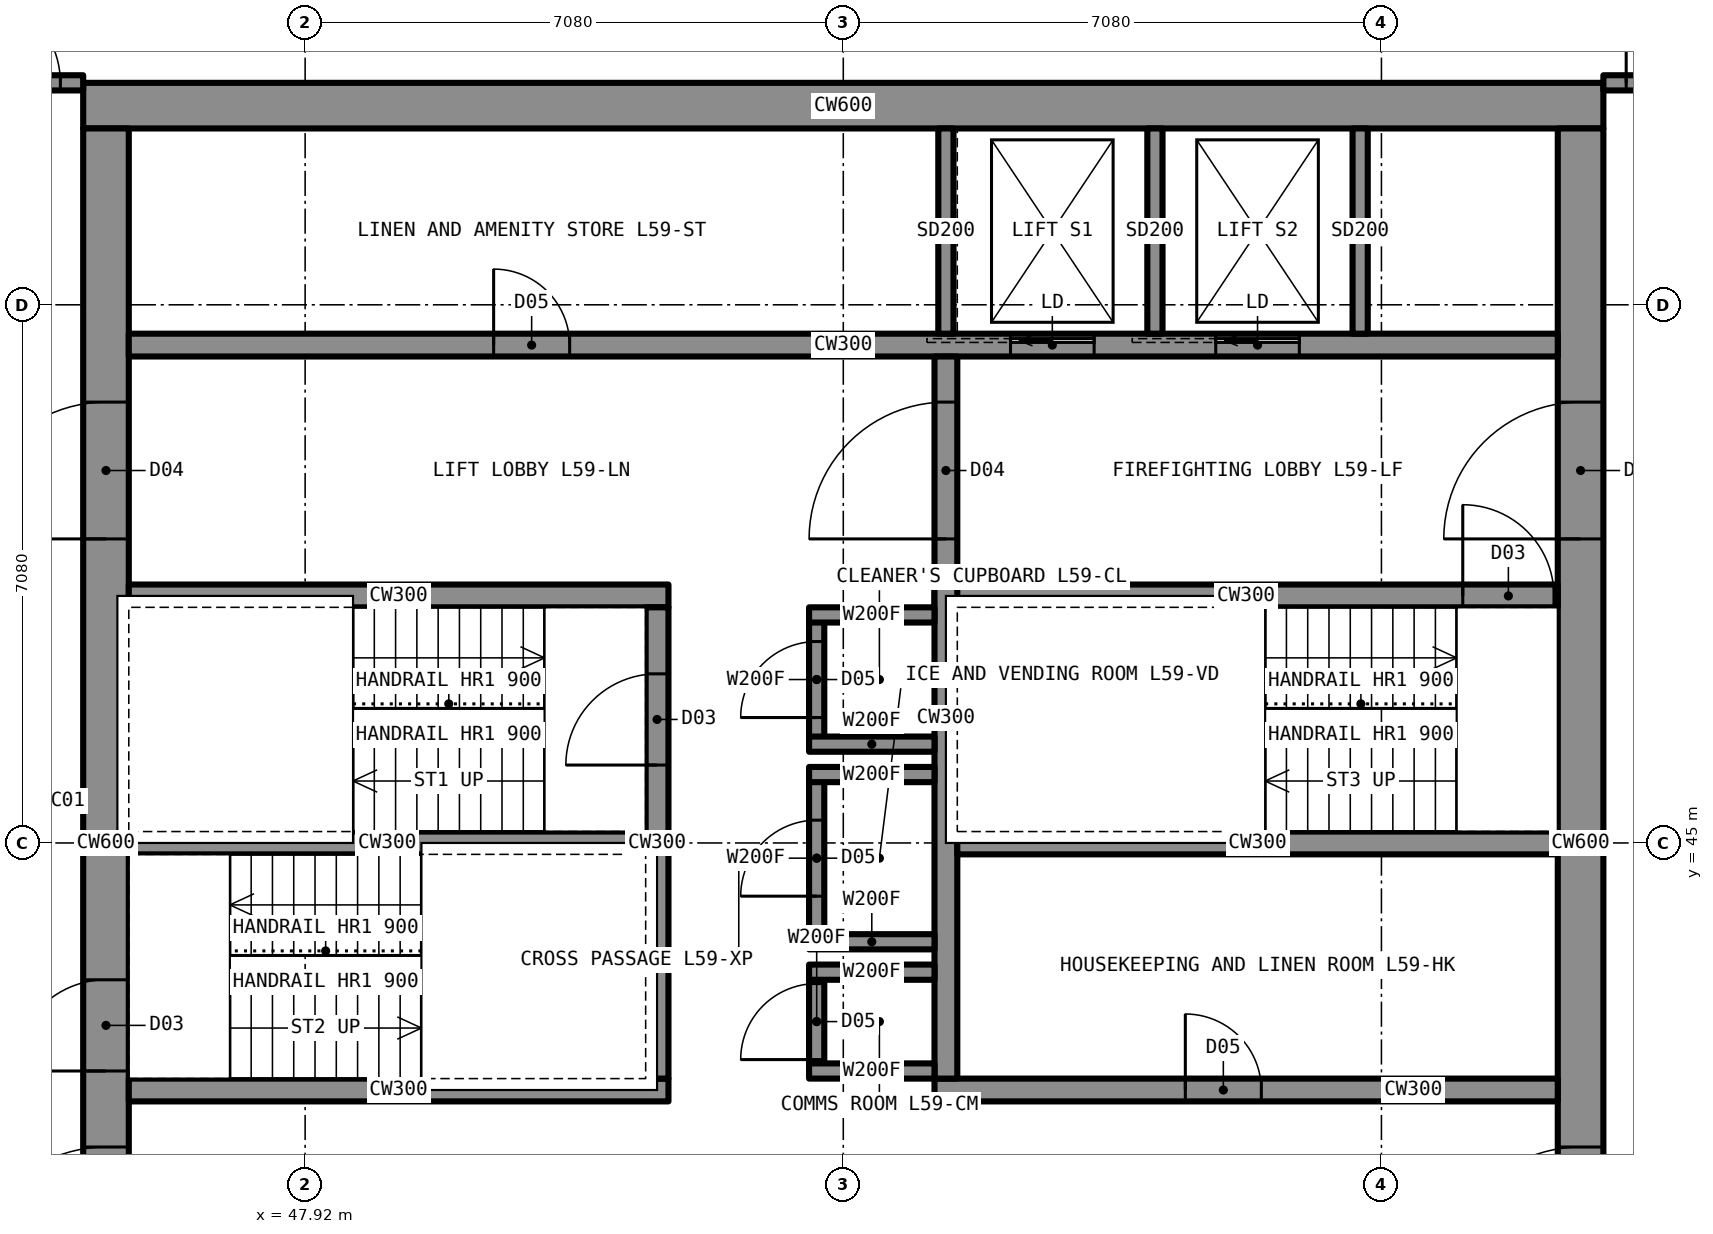
"""IFC4 building model, lengths in metres.
Left out: names, types, materials, properties, quantities, classifications, styles, units other than length and angle.
Written with IfcOpenShell. Run it as: python <this file> out.ifc"""

import sys

from ifc_helpers import new_model, si_unit, direction, frame, frame_2d, origin, place, context, subcontext, project, spatial, rectangle, extrude, element, fill, save


model = new_model("IFC4")
c1 = context("Model", 3, precision=1e-05, world=origin(), true_north=direction((0.0, 1.0)))
c2 = subcontext(c1, "Body", "Model", "MODEL_VIEW")
j1 = project(units=[si_unit("LENGTHUNIT", "METRE"), si_unit("PLANEANGLEUNIT", "RADIAN")], contexts=[c1])
p1 = place(None, origin())
s1 = spatial("IfcSite", under=j1, at=p1, CompositionType="ELEMENT")
p2 = place(p1, origin())
s2 = spatial("IfcBuilding", under=s1, at=p2, CompositionType="ELEMENT")
p3 = place(p2, frame((0.0, 0.0, 214.3)))
s3 = spatial("IfcBuildingStorey", under=s2, at=p3, CompositionType="ELEMENT", Elevation=214.3)
p4 = place(p3, frame((45.0, 54.7, 0.0), z_axis=(0.0, 0.0, 1.0), x_axis=(1.0, 0.0, 0.0)))
e1 = element("IfcWall", 1, at=p4, inside=s3, PredefinedType="SHEAR", context=c2, shape_type="SweptSolid", body=[
    extrude(rectangle(XDim=20.0, YDim=0.6, at=frame_2d((10.0, 0.0))), origin(), (0.0, 0.0, 1.0), 3.5),
])
p5 = place(p3, frame((64.7, 35.6, 0.0), z_axis=(0.0, 0.0, 1.0), x_axis=(0.0, 1.0, 0.0)))
e2 = element("IfcWall", 2, at=p5, inside=s3, PredefinedType="SHEAR", context=c2, shape_type="SweptSolid", body=[
    extrude(rectangle(XDim=18.8, YDim=0.6, at=frame_2d((9.4, 0.0))), origin(), (0.0, 0.0, 1.0), 3.5),
])
p6 = place(p5, frame((13.4, 0.0, 0.0)))
e3 = element("IfcOpeningElement", 3, at=p6, cuts=e2, PredefinedType="OPENING", context=c2, shape_type="SweptSolid", body=[
    extrude(rectangle(XDim=1.8, YDim=2.2, at=frame_2d((0.9, 1.1))), frame((0.0, 0.31, 0.0), z_axis=(0.0, -1.0, 0.0), x_axis=(1.0, 0.0, 0.0)), (0.0, 0.0, 1.0), 0.62),
])
p7 = place(p5, frame((3.6, 0.0, 0.0)))
e4 = element("IfcOpeningElement", 4, at=p7, cuts=e2, PredefinedType="OPENING", context=c2, shape_type="SweptSolid", body=[
    extrude(rectangle(XDim=1.8, YDim=2.2, at=frame_2d((0.9, 1.1))), frame((0.0, 0.31, 0.0), z_axis=(0.0, -1.0, 0.0), x_axis=(1.0, 0.0, 0.0)), (0.0, 0.0, 1.0), 0.62),
])
p8 = place(p3, frame((45.3, 35.6, 0.0), z_axis=(0.0, 0.0, 1.0), x_axis=(0.0, 1.0, 0.0)))
e5 = element("IfcWall", 5, at=p8, inside=s3, PredefinedType="SHEAR", context=c2, shape_type="SweptSolid", body=[
    extrude(rectangle(XDim=18.8, YDim=0.6, at=frame_2d((9.4, 0.0))), origin(), (0.0, 0.0, 1.0), 3.5),
])
p9 = place(p8, frame((13.4, 0.0, 0.0)))
e6 = element("IfcOpeningElement", 6, at=p9, cuts=e5, PredefinedType="OPENING", context=c2, shape_type="SweptSolid", body=[
    extrude(rectangle(XDim=1.8, YDim=2.2, at=frame_2d((0.9, 1.1))), frame((0.0, 0.31, 0.0), z_axis=(0.0, -1.0, 0.0), x_axis=(1.0, 0.0, 0.0)), (0.0, 0.0, 1.0), 0.62),
])
p10 = place(p8, frame((3.6, 0.0, 0.0)))
e7 = element("IfcOpeningElement", 7, at=p10, cuts=e5, PredefinedType="OPENING", context=c2, shape_type="SweptSolid", body=[
    extrude(rectangle(XDim=1.8, YDim=2.2, at=frame_2d((0.9, 1.1))), frame((0.0, 0.31, 0.0), z_axis=(0.0, -1.0, 0.0), x_axis=(1.0, 0.0, 0.0)), (0.0, 0.0, 1.0), 0.62),
])
p11 = place(p8, frame((6.4, 0.0, 0.0)))
e8 = element("IfcOpeningElement", 8, at=p11, cuts=e5, PredefinedType="OPENING", context=c2, shape_type="SweptSolid", body=[
    extrude(rectangle(XDim=1.2, YDim=2.2, at=frame_2d((0.6, 1.1))), frame((0.0, 0.31, 0.0), z_axis=(0.0, -1.0, 0.0), x_axis=(1.0, 0.0, 0.0)), (0.0, 0.0, 1.0), 0.62),
])
p12 = place(p3, frame((45.6, 51.55, 0.0), z_axis=(0.0, 0.0, 1.0), x_axis=(1.0, 0.0, 0.0)))
e9 = element("IfcWall", 9, at=p12, inside=s3, PredefinedType="SHEAR", context=c2, shape_type="SweptSolid", body=[
    extrude(rectangle(XDim=18.8, YDim=0.3, at=frame_2d((9.4, 0.0))), origin(), (0.0, 0.0, 1.0), 3.5),
])
p13 = place(p12, frame((4.8, 0.0, 0.0)))
e10 = element("IfcOpeningElement", 10, at=p13, cuts=e9, PredefinedType="OPENING", context=c2, shape_type="SweptSolid", body=[
    extrude(rectangle(XDim=1.0, YDim=2.1, at=frame_2d((0.5, 1.05))), frame((0.0, 0.16, 0.0), z_axis=(0.0, -1.0, 0.0), x_axis=(1.0, 0.0, 0.0)), (0.0, 0.0, 1.0), 0.32),
])
p14 = place(p12, frame((11.6, 0.0, 0.0)))
e11 = element("IfcOpeningElement", 11, at=p14, cuts=e9, PredefinedType="OPENING", context=c2, shape_type="SweptSolid", body=[
    extrude(rectangle(XDim=1.1, YDim=2.2, at=frame_2d((0.55, 1.1))), frame((0.0, 0.16, 0.0), z_axis=(0.0, -1.0, 0.0), x_axis=(1.0, 0.0, 0.0)), (0.0, 0.0, 1.0), 0.32),
])
p15 = place(p12, frame((14.3, 0.0, 0.0)))
e12 = element("IfcOpeningElement", 12, at=p15, cuts=e9, PredefinedType="OPENING", context=c2, shape_type="SweptSolid", body=[
    extrude(rectangle(XDim=1.1, YDim=2.2, at=frame_2d((0.55, 1.1))), frame((0.0, 0.16, 0.0), z_axis=(0.0, -1.0, 0.0), x_axis=(1.0, 0.0, 0.0)), (0.0, 0.0, 1.0), 0.32),
])
p16 = place(p3, frame((45.6, 48.25, 0.0), z_axis=(0.0, 0.0, 1.0), x_axis=(1.0, 0.0, 0.0)))
e13 = element("IfcWall", 13, at=p16, inside=s3, PredefinedType="SHEAR", context=c2, shape_type="SweptSolid", body=[
    extrude(rectangle(XDim=7.1, YDim=0.3, at=frame_2d((3.55, 0.0))), origin(), (0.0, 0.0, 1.0), 3.5),
])
p17 = place(p3, frame((56.2, 48.25, 0.0), z_axis=(0.0, 0.0, 1.0), x_axis=(1.0, 0.0, 0.0)))
e14 = element("IfcWall", 14, at=p17, inside=s3, PredefinedType="SHEAR", context=c2, shape_type="SweptSolid", body=[
    extrude(rectangle(XDim=8.2, YDim=0.3, at=frame_2d((4.1, 0.0))), origin(), (0.0, 0.0, 1.0), 3.5),
])
p18 = place(p17, frame((6.95, 0.0, 0.0)))
e15 = element("IfcOpeningElement", 15, at=p18, cuts=e14, PredefinedType="OPENING", context=c2, shape_type="SweptSolid", body=[
    extrude(rectangle(XDim=1.2, YDim=2.2, at=frame_2d((0.6, 1.1))), frame((0.0, 0.16, 0.0), z_axis=(0.0, -1.0, 0.0), x_axis=(1.0, 0.0, 0.0)), (0.0, 0.0, 1.0), 0.32),
])
p19 = place(p3, frame((45.6, 41.75, 0.0), z_axis=(0.0, 0.0, 1.0), x_axis=(1.0, 0.0, 0.0)))
e16 = element("IfcWall", 16, at=p19, inside=s3, PredefinedType="SHEAR", context=c2, shape_type="SweptSolid", body=[
    extrude(rectangle(XDim=7.1, YDim=0.3, at=frame_2d((3.55, 0.0))), origin(), (0.0, 0.0, 1.0), 3.5),
])
p20 = place(p3, frame((56.2, 41.75, 0.0), z_axis=(0.0, 0.0, 1.0), x_axis=(1.0, 0.0, 0.0)))
e17 = element("IfcWall", 17, at=p20, inside=s3, PredefinedType="SHEAR", context=c2, shape_type="SweptSolid", body=[
    extrude(rectangle(XDim=8.2, YDim=0.3, at=frame_2d((4.1, 0.0))), origin(), (0.0, 0.0, 1.0), 3.5),
])
p21 = place(p20, frame((3.3, 0.0, 0.0)))
e18 = element("IfcOpeningElement", 18, at=p21, cuts=e17, PredefinedType="OPENING", context=c2, shape_type="SweptSolid", body=[
    extrude(rectangle(XDim=1.0, YDim=2.1, at=frame_2d((0.5, 1.05))), frame((0.0, 0.16, 0.0), z_axis=(0.0, -1.0, 0.0), x_axis=(1.0, 0.0, 0.0)), (0.0, 0.0, 1.0), 0.32),
])
p22 = place(p3, frame((52.55, 41.9, 0.0), z_axis=(0.0, 0.0, 1.0), x_axis=(0.0, 1.0, 0.0)))
e19 = element("IfcWall", 19, at=p22, inside=s3, PredefinedType="SHEAR", context=c2, shape_type="SweptSolid", body=[
    extrude(rectangle(XDim=6.2, YDim=0.3, at=frame_2d((3.1, 0.0))), origin(), (0.0, 0.0, 1.0), 3.5),
])
p23 = place(p22, frame((4.125, 0.0, 0.0)))
e20 = element("IfcOpeningElement", 20, at=p23, cuts=e19, PredefinedType="OPENING", context=c2, shape_type="SweptSolid", body=[
    extrude(rectangle(XDim=1.2, YDim=2.2, at=frame_2d((0.6, 1.1))), frame((0.0, 0.16, 0.0), z_axis=(0.0, -1.0, 0.0), x_axis=(1.0, 0.0, 0.0)), (0.0, 0.0, 1.0), 0.32),
])
p24 = place(p3, frame((56.35, 41.9, 0.0), z_axis=(0.0, 0.0, 1.0), x_axis=(0.0, 1.0, 0.0)))
e21 = element("IfcWall", 21, at=p24, inside=s3, PredefinedType="SHEAR", context=c2, shape_type="SweptSolid", body=[
    extrude(rectangle(XDim=9.5, YDim=0.3, at=frame_2d((4.75, 0.0))), origin(), (0.0, 0.0, 1.0), 3.5),
])
p25 = place(p24, frame((7.1, 0.0, 0.0)))
e22 = element("IfcOpeningElement", 22, at=p25, cuts=e21, PredefinedType="OPENING", context=c2, shape_type="SweptSolid", body=[
    extrude(rectangle(XDim=1.8, YDim=2.2, at=frame_2d((0.9, 1.1))), frame((0.0, 0.16, 0.0), z_axis=(0.0, -1.0, 0.0), x_axis=(1.0, 0.0, 0.0)), (0.0, 0.0, 1.0), 0.32),
])
p26 = place(p3, frame((45.6, 45.0, 0.0), z_axis=(0.0, 0.0, 1.0), x_axis=(1.0, 0.0, 0.0)))
e23 = element("IfcWall", 23, at=p26, inside=s3, PredefinedType="SHEAR", context=c2, shape_type="SweptSolid", body=[
    extrude(rectangle(XDim=6.8, YDim=0.3, at=frame_2d((3.4, 0.0))), origin(), (0.0, 0.0, 1.0), 3.5),
])
p27 = place(p3, frame((56.5, 45.0, 0.0), z_axis=(0.0, 0.0, 1.0), x_axis=(1.0, 0.0, 0.0)))
e24 = element("IfcWall", 24, at=p27, inside=s3, PredefinedType="SHEAR", context=c2, shape_type="SweptSolid", body=[
    extrude(rectangle(XDim=7.9, YDim=0.3, at=frame_2d((3.95, 0.0))), origin(), (0.0, 0.0, 1.0), 3.5),
])
p28 = place(p3, frame((43.2, 55.0, 0.0), z_axis=(0.0, 0.0, 1.0), x_axis=(1.0, 0.0, 0.0)))
e25 = element("IfcWall", 25, at=p28, inside=s3, PredefinedType="PARTITIONING", context=c2, shape_type="SweptSolid", body=[
    extrude(rectangle(XDim=1.8, YDim=0.2, at=frame_2d((0.9, 0.0))), origin(), (0.0, 0.0, 1.0), 3.33),
])
p29 = place(p28, frame((0.3, 0.0, 0.0)))
e26 = element("IfcOpeningElement", 26, at=p29, cuts=e25, PredefinedType="OPENING", context=c2, shape_type="SweptSolid", body=[
    extrude(rectangle(XDim=1.2, YDim=2.2, at=frame_2d((0.6, 1.1))), frame((0.0, 0.11, 0.0), z_axis=(0.0, -1.0, 0.0), x_axis=(1.0, 0.0, 0.0)), (0.0, 0.0, 1.0), 0.22),
])
p30 = place(p3, frame((65.0, 55.0, 0.0), z_axis=(0.0, 0.0, 1.0), x_axis=(1.0, 0.0, 0.0)))
e27 = element("IfcWall", 27, at=p30, inside=s3, PredefinedType="PARTITIONING", context=c2, shape_type="SweptSolid", body=[
    extrude(rectangle(XDim=1.8, YDim=0.2, at=frame_2d((0.9, 0.0))), origin(), (0.0, 0.0, 1.0), 3.33),
])
p31 = place(p30, frame((0.3, 0.0, 0.0)))
e28 = element("IfcOpeningElement", 28, at=p31, cuts=e27, PredefinedType="OPENING", context=c2, shape_type="SweptSolid", body=[
    extrude(rectangle(XDim=1.2, YDim=2.2, at=frame_2d((0.6, 1.1))), frame((0.0, 0.11, 0.0), z_axis=(0.0, -1.0, 0.0), x_axis=(1.0, 0.0, 0.0)), (0.0, 0.0, 1.0), 0.22),
])
p32 = place(p3, frame((54.35, 42.0, 0.0), z_axis=(0.0, 0.0, 1.0), x_axis=(0.0, 1.0, 0.0)))
e29 = element("IfcWall", 29, at=p32, inside=s3, PredefinedType="PARTITIONING", context=c2, shape_type="SweptSolid", body=[
    extrude(rectangle(XDim=1.7, YDim=0.2, at=frame_2d((0.85, 0.0))), origin(), (0.0, 0.0, 1.0), 3.33),
])
p33 = place(p32, frame((0.35, 0.0, 0.0)))
e30 = element("IfcOpeningElement", 30, at=p33, cuts=e29, PredefinedType="OPENING", context=c2, shape_type="SweptSolid", body=[
    extrude(rectangle(XDim=1.0, YDim=2.1, at=frame_2d((0.5, 1.05))), frame((0.0, 0.11, 0.0), z_axis=(0.0, -1.0, 0.0), x_axis=(1.0, 0.0, 0.0)), (0.0, 0.0, 1.0), 0.22),
])
for number, where, z_axis, x_axis in (
    (31, (54.25, 42.0, 0.0), (0.0, 0.0, 1.0), (1.0, 0.0, 0.0)),
    (32, (54.25, 43.7, 0.0), (0.0, 0.0, 1.0), (1.0, 0.0, 0.0)),
):
    element("IfcWall", number, at=place(p3, frame(where, z_axis=z_axis, x_axis=x_axis)), inside=s3, PredefinedType="PARTITIONING", context=c2, shape_type="SweptSolid", body=[
        extrude(rectangle(XDim=1.95, YDim=0.2, at=frame_2d((0.975, 0.0))), origin(), (0.0, 0.0, 1.0), 3.33),
    ])
p34 = place(p3, frame((54.35, 44.1, 0.0), z_axis=(0.0, 0.0, 1.0), x_axis=(0.0, 1.0, 0.0)))
e33 = element("IfcWall", 33, at=p34, inside=s3, PredefinedType="PARTITIONING", context=c2, shape_type="SweptSolid", body=[
    extrude(rectangle(XDim=3.9, YDim=0.2, at=frame_2d((1.95, 0.0))), origin(), (0.0, 0.0, 1.0), 3.33),
])
p35 = place(p34, frame((1.45, 0.0, 0.0)))
e34 = element("IfcOpeningElement", 34, at=p35, cuts=e33, PredefinedType="OPENING", context=c2, shape_type="SweptSolid", body=[
    extrude(rectangle(XDim=1.0, YDim=2.1, at=frame_2d((0.5, 1.05))), frame((0.0, 0.11, 0.0), z_axis=(0.0, -1.0, 0.0), x_axis=(1.0, 0.0, 0.0)), (0.0, 0.0, 1.0), 0.22),
])
for number, where, z_axis, x_axis in (
    (35, (54.25, 44.1, 0.0), (0.0, 0.0, 1.0), (1.0, 0.0, 0.0)),
    (36, (54.25, 48.0, 0.0), (0.0, 0.0, 1.0), (1.0, 0.0, 0.0)),
):
    element("IfcWall", number, at=place(p3, frame(where, z_axis=z_axis, x_axis=x_axis)), inside=s3, PredefinedType="PARTITIONING", context=c2, shape_type="SweptSolid", body=[
        extrude(rectangle(XDim=1.95, YDim=0.2, at=frame_2d((0.975, 0.0))), origin(), (0.0, 0.0, 1.0), 3.33),
    ])
for number, where, z_axis, x_axis in (
    (37, (59.1, 51.7, 0.0), (0.0, 0.0, 1.0), (0.0, 1.0, 0.0)),
    (38, (61.8, 51.7, 0.0), (0.0, 0.0, 1.0), (0.0, 1.0, 0.0)),
    (39, (56.35, 51.7, 0.0), (0.0, 0.0, 1.0), (0.0, 1.0, 0.0)),
):
    element("IfcWall", number, at=place(p3, frame(where, z_axis=z_axis, x_axis=x_axis)), inside=s3, PredefinedType="PARTITIONING", context=c2, shape_type="SweptSolid", body=[
        extrude(rectangle(XDim=2.7, YDim=0.2, at=frame_2d((1.35, 0.0))), origin(), (0.0, 0.0, 1.0), 3.33),
    ])
p36 = place(p29, origin())
e40 = element("IfcDoor", 40, at=p36, inside=s3, OperationType="SINGLE_SWING_LEFT", PredefinedType="DOOR", context=c2, shape_type="SweptSolid", body=[
    extrude(rectangle(XDim=1.2, YDim=2.2, at=frame_2d((0.6, 1.1))), frame((0.0, 0.025, 0.0), z_axis=(0.0, -1.0, 0.0), x_axis=(1.0, 0.0, 0.0)), (0.0, 0.0, 1.0), 0.05),
])
fill(e26, e40)
p37 = place(p31, origin())
e41 = element("IfcDoor", 41, at=p37, inside=s3, OperationType="SINGLE_SWING_LEFT", PredefinedType="DOOR", context=c2, shape_type="SweptSolid", body=[
    extrude(rectangle(XDim=1.2, YDim=2.2, at=frame_2d((0.6, 1.1))), frame((0.0, 0.025, 0.0), z_axis=(0.0, -1.0, 0.0), x_axis=(1.0, 0.0, 0.0)), (0.0, 0.0, 1.0), 0.05),
])
fill(e28, e41)
p38 = place(p33, origin())
e42 = element("IfcDoor", 42, at=p38, inside=s3, OperationType="SINGLE_SWING_LEFT", PredefinedType="DOOR", context=c2, shape_type="SweptSolid", body=[
    extrude(rectangle(XDim=1.0, YDim=2.1, at=frame_2d((0.5, 1.05))), frame((0.0, 0.025, 0.0), z_axis=(0.0, -1.0, 0.0), x_axis=(1.0, 0.0, 0.0)), (0.0, 0.0, 1.0), 0.05),
])
fill(e30, e42)
p39 = place(p35, origin())
e43 = element("IfcDoor", 43, at=p39, inside=s3, OperationType="SINGLE_SWING_LEFT", PredefinedType="DOOR", context=c2, shape_type="SweptSolid", body=[
    extrude(rectangle(XDim=1.0, YDim=2.1, at=frame_2d((0.5, 1.05))), frame((0.0, 0.025, 0.0), z_axis=(0.0, -1.0, 0.0), x_axis=(1.0, 0.0, 0.0)), (0.0, 0.0, 1.0), 0.05),
])
fill(e34, e43)
p40 = place(p9, origin())
e44 = element("IfcDoor", 44, at=p40, inside=s3, OperationType="DOUBLE_DOOR_SINGLE_SWING", PredefinedType="DOOR", context=c2, shape_type="SweptSolid", body=[
    extrude(rectangle(XDim=1.8, YDim=2.2, at=frame_2d((0.9, 1.1))), frame((0.0, 0.025, 0.0), z_axis=(0.0, -1.0, 0.0), x_axis=(1.0, 0.0, 0.0)), (0.0, 0.0, 1.0), 0.05),
])
fill(e6, e44)
p41 = place(p10, origin())
e45 = element("IfcDoor", 45, at=p41, inside=s3, OperationType="DOUBLE_DOOR_SINGLE_SWING", PredefinedType="DOOR", context=c2, shape_type="SweptSolid", body=[
    extrude(rectangle(XDim=1.8, YDim=2.2, at=frame_2d((0.9, 1.1))), frame((0.0, 0.025, 0.0), z_axis=(0.0, -1.0, 0.0), x_axis=(1.0, 0.0, 0.0)), (0.0, 0.0, 1.0), 0.05),
])
fill(e7, e45)
p42 = place(p6, origin())
e46 = element("IfcDoor", 46, at=p42, inside=s3, OperationType="DOUBLE_DOOR_SINGLE_SWING", PredefinedType="DOOR", context=c2, shape_type="SweptSolid", body=[
    extrude(rectangle(XDim=1.8, YDim=2.2, at=frame_2d((0.9, 1.1))), frame((0.0, 0.025, 0.0), z_axis=(0.0, -1.0, 0.0), x_axis=(1.0, 0.0, 0.0)), (0.0, 0.0, 1.0), 0.05),
])
fill(e3, e46)
p43 = place(p7, origin())
e47 = element("IfcDoor", 47, at=p43, inside=s3, OperationType="DOUBLE_DOOR_SINGLE_SWING", PredefinedType="DOOR", context=c2, shape_type="SweptSolid", body=[
    extrude(rectangle(XDim=1.8, YDim=2.2, at=frame_2d((0.9, 1.1))), frame((0.0, 0.025, 0.0), z_axis=(0.0, -1.0, 0.0), x_axis=(1.0, 0.0, 0.0)), (0.0, 0.0, 1.0), 0.05),
])
fill(e4, e47)
p44 = place(p25, origin())
e48 = element("IfcDoor", 48, at=p44, inside=s3, OperationType="DOUBLE_DOOR_SINGLE_SWING", PredefinedType="DOOR", context=c2, shape_type="SweptSolid", body=[
    extrude(rectangle(XDim=1.8, YDim=2.2, at=frame_2d((0.9, 1.1))), frame((0.0, 0.025, 0.0), z_axis=(0.0, -1.0, 0.0), x_axis=(1.0, 0.0, 0.0)), (0.0, 0.0, 1.0), 0.05),
])
fill(e22, e48)
p45 = place(p23, origin())
e49 = element("IfcDoor", 49, at=p45, inside=s3, OperationType="SINGLE_SWING_LEFT", PredefinedType="DOOR", context=c2, shape_type="SweptSolid", body=[
    extrude(rectangle(XDim=1.2, YDim=2.2, at=frame_2d((0.6, 1.1))), frame((0.0, 0.025, 0.0), z_axis=(0.0, -1.0, 0.0), x_axis=(1.0, 0.0, 0.0)), (0.0, 0.0, 1.0), 0.05),
])
fill(e20, e49)
p46 = place(p11, origin())
e50 = element("IfcDoor", 50, at=p46, inside=s3, OperationType="SINGLE_SWING_LEFT", PredefinedType="DOOR", context=c2, shape_type="SweptSolid", body=[
    extrude(rectangle(XDim=1.2, YDim=2.2, at=frame_2d((0.6, 1.1))), frame((0.0, 0.025, 0.0), z_axis=(0.0, -1.0, 0.0), x_axis=(1.0, 0.0, 0.0)), (0.0, 0.0, 1.0), 0.05),
])
fill(e8, e50)
p47 = place(p18, origin())
e51 = element("IfcDoor", 51, at=p47, inside=s3, OperationType="SINGLE_SWING_LEFT", PredefinedType="DOOR", context=c2, shape_type="SweptSolid", body=[
    extrude(rectangle(XDim=1.2, YDim=2.2, at=frame_2d((0.6, 1.1))), frame((0.0, 0.025, 0.0), z_axis=(0.0, -1.0, 0.0), x_axis=(1.0, 0.0, 0.0)), (0.0, 0.0, 1.0), 0.05),
])
fill(e15, e51)
p48 = place(p21, origin())
e52 = element("IfcDoor", 52, at=p48, inside=s3, OperationType="SINGLE_SWING_LEFT", PredefinedType="DOOR", context=c2, shape_type="SweptSolid", body=[
    extrude(rectangle(XDim=1.0, YDim=2.1, at=frame_2d((0.5, 1.05))), frame((0.0, 0.025, 0.0), z_axis=(0.0, -1.0, 0.0), x_axis=(1.0, 0.0, 0.0)), (0.0, 0.0, 1.0), 0.05),
])
fill(e18, e52)
p49 = place(p13, origin())
e53 = element("IfcDoor", 53, at=p49, inside=s3, OperationType="SINGLE_SWING_LEFT", PredefinedType="DOOR", context=c2, shape_type="SweptSolid", body=[
    extrude(rectangle(XDim=1.0, YDim=2.1, at=frame_2d((0.5, 1.05))), frame((0.0, 0.025, 0.0), z_axis=(0.0, -1.0, 0.0), x_axis=(1.0, 0.0, 0.0)), (0.0, 0.0, 1.0), 0.05),
])
fill(e10, e53)
p50 = place(p14, origin())
e54 = element("IfcDoor", 54, at=p50, inside=s3, OperationType="SLIDING_TO_LEFT", PredefinedType="DOOR", context=c2, shape_type="SweptSolid", body=[
    extrude(rectangle(XDim=1.1, YDim=2.2, at=frame_2d((0.55, 1.1))), frame((0.0, 0.025, 0.0), z_axis=(0.0, -1.0, 0.0), x_axis=(1.0, 0.0, 0.0)), (0.0, 0.0, 1.0), 0.05),
])
fill(e11, e54)
p51 = place(p15, origin())
e55 = element("IfcDoor", 55, at=p51, inside=s3, OperationType="SLIDING_TO_LEFT", PredefinedType="DOOR", context=c2, shape_type="SweptSolid", body=[
    extrude(rectangle(XDim=1.1, YDim=2.2, at=frame_2d((0.55, 1.1))), frame((0.0, 0.025, 0.0), z_axis=(0.0, -1.0, 0.0), x_axis=(1.0, 0.0, 0.0)), (0.0, 0.0, 1.0), 0.05),
])
fill(e12, e55)
save(model, sys.argv[1])
